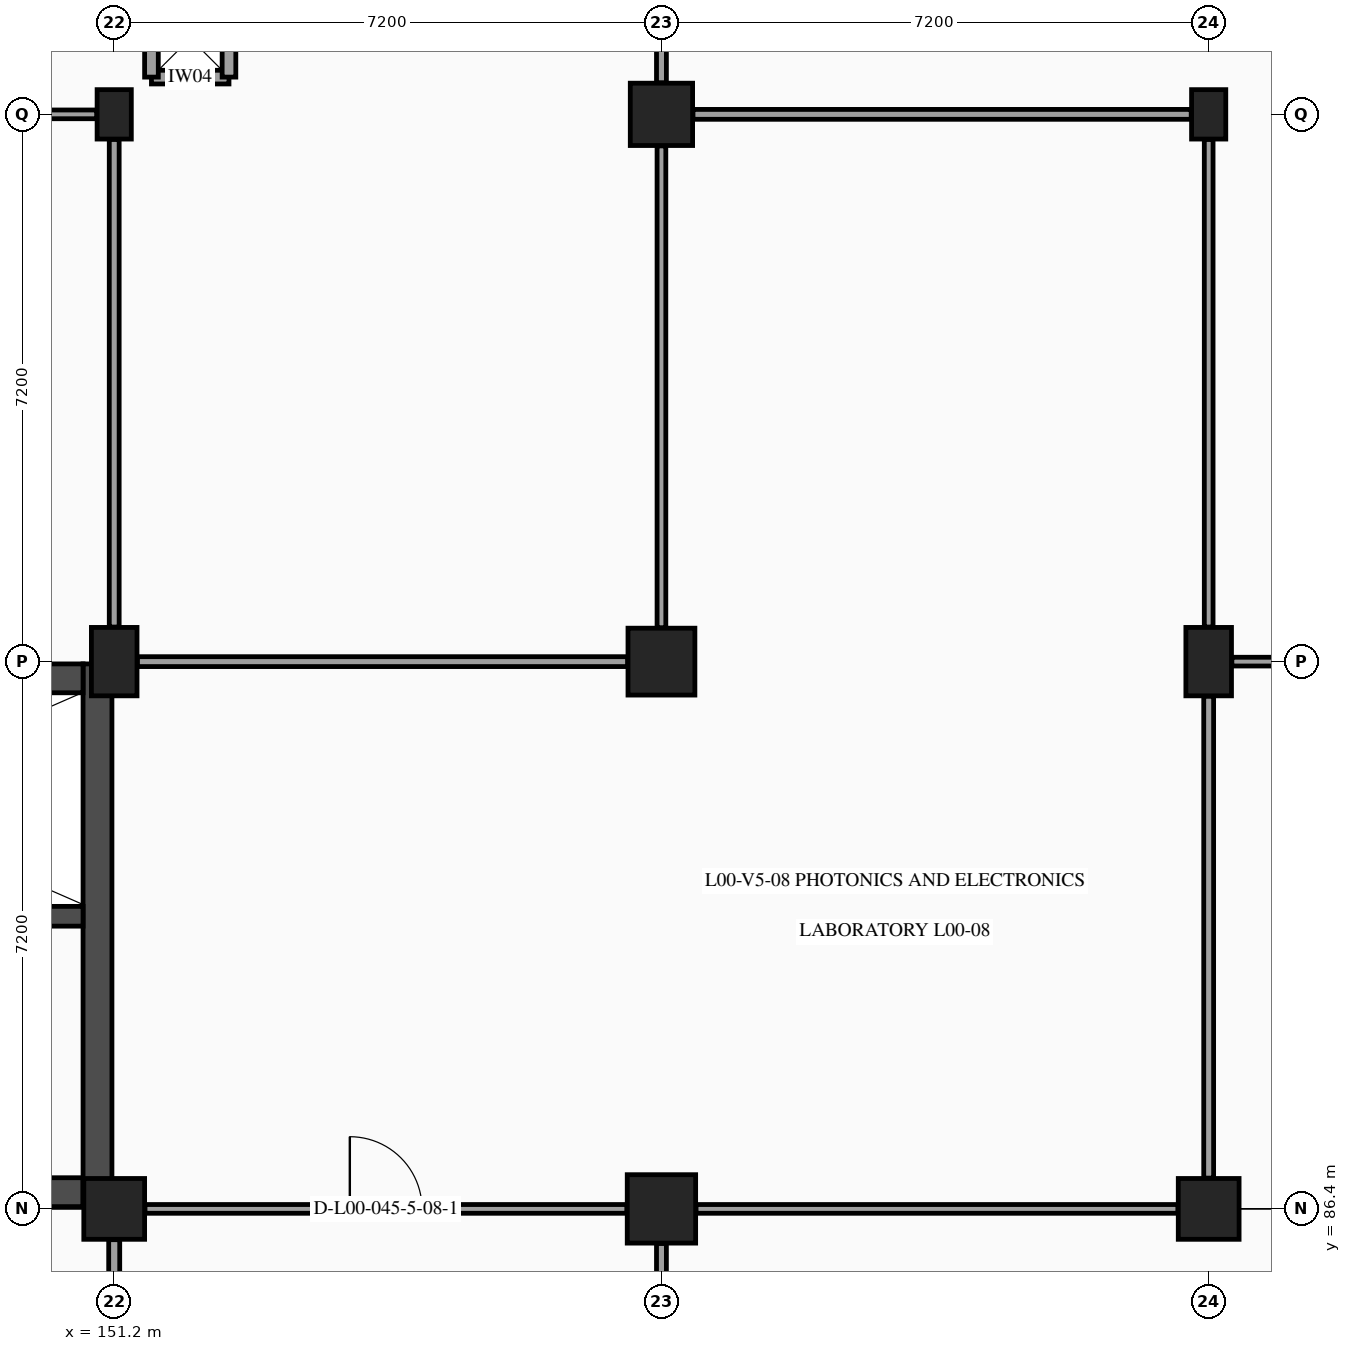
"""IFC4 building model, lengths in metres.
Left out: names, types, materials, properties, quantities, classifications, styles, units other than length and angle.
Written with IfcOpenShell. Run it as: python <this file> out.ifc"""

import sys

from ifc_helpers import new_model, si_unit, direction, frame, frame_2d, origin, origin_2d, place, context, subcontext, project, spatial, rectangle, extrude, element, fill, save


model = new_model("IFC4")
c1 = context("Model", 3, precision=1e-05, world=origin(), true_north=direction((0.0, 1.0)))
c2 = subcontext(c1, "Body", "Model", "MODEL_VIEW")
j1 = project(units=[si_unit("LENGTHUNIT", "METRE"), si_unit("PLANEANGLEUNIT", "RADIAN")], contexts=[c1])
p1 = place(None, origin())
s1 = spatial("IfcSite", under=j1, at=p1, CompositionType="ELEMENT")
p2 = place(p1, origin())
s2 = spatial("IfcBuilding", under=s1, at=p2, CompositionType="ELEMENT")
p3 = place(p2, origin())
s3 = spatial("IfcBuildingStorey", under=s2, at=p3, CompositionType="ELEMENT", Elevation=0.0)
p4 = place(p3, frame((151.2, 86.4, 0.0), z_axis=(0.0, 0.0, 1.0), x_axis=(1.0, 0.0, 0.0)))
e1 = element("IfcColumn", 1, at=p4, inside=s3, PredefinedType="COLUMN", context=c2, shape_type="SweptSolid", body=[
    extrude(rectangle(XDim=0.8, YDim=0.8, at=origin_2d()), origin(), (0.0, 0.0, 1.0), 5.4),
])
p5 = place(p3, frame((151.2, 93.6, 0.0), z_axis=(0.0, 0.0, 1.0), x_axis=(1.0, 0.0, 0.0)))
e2 = element("IfcColumn", 2, at=p5, inside=s3, PredefinedType="COLUMN", context=c2, shape_type="SweptSolid", body=[
    extrude(rectangle(XDim=0.6, YDim=0.9, at=origin_2d()), origin(), (0.0, 0.0, 1.0), 5.4),
])
p6 = place(p3, frame((151.2, 100.8, 0.0), z_axis=(0.0, 0.0, 1.0), x_axis=(1.0, 0.0, 0.0)))
e3 = element("IfcColumn", 3, at=p6, inside=s3, PredefinedType="PILASTER", context=c2, shape_type="SweptSolid", body=[
    extrude(rectangle(XDim=0.45, YDim=0.65, at=origin_2d()), origin(), (0.0, 0.0, 1.0), 5.4),
])
p7 = place(p3, frame((158.4, 86.4, 0.0), z_axis=(0.0, 0.0, 1.0), x_axis=(1.0, 0.0, 0.0)))
e4 = element("IfcColumn", 4, at=p7, inside=s3, PredefinedType="COLUMN", context=c2, shape_type="SweptSolid", body=[
    extrude(rectangle(XDim=0.9, YDim=0.9, at=origin_2d()), origin(), (0.0, 0.0, 1.0), 5.4),
])
p8 = place(p3, frame((158.4, 93.6, 0.0), z_axis=(0.0, 0.0, 1.0), x_axis=(1.0, 0.0, 0.0)))
e5 = element("IfcColumn", 5, at=p8, inside=s3, PredefinedType="COLUMN", context=c2, shape_type="SweptSolid", body=[
    extrude(rectangle(XDim=0.88, YDim=0.88, at=origin_2d()), origin(), (0.0, 0.0, 1.0), 5.4),
])
p9 = place(p3, frame((158.4, 100.8, 0.0), z_axis=(0.0, 0.0, 1.0), x_axis=(1.0, 0.0, 0.0)))
e6 = element("IfcColumn", 6, at=p9, inside=s3, PredefinedType="COLUMN", context=c2, shape_type="SweptSolid", body=[
    extrude(rectangle(XDim=0.82, YDim=0.82, at=origin_2d()), origin(), (0.0, 0.0, 1.0), 5.4),
])
p10 = place(p3, frame((165.6, 86.4, 0.0), z_axis=(0.0, 0.0, 1.0), x_axis=(1.0, 0.0, 0.0)))
e7 = element("IfcColumn", 7, at=p10, inside=s3, PredefinedType="COLUMN", context=c2, shape_type="SweptSolid", body=[
    extrude(rectangle(XDim=0.8, YDim=0.8, at=origin_2d()), origin(), (0.0, 0.0, 1.0), 5.4),
])
p11 = place(p3, frame((165.6, 93.6, 0.0), z_axis=(0.0, 0.0, 1.0), x_axis=(1.0, 0.0, 0.0)))
e8 = element("IfcColumn", 8, at=p11, inside=s3, PredefinedType="COLUMN", context=c2, shape_type="SweptSolid", body=[
    extrude(rectangle(XDim=0.6, YDim=0.9, at=origin_2d()), origin(), (0.0, 0.0, 1.0), 5.4),
])
p12 = place(p3, frame((165.6, 100.8, 0.0), z_axis=(0.0, 0.0, 1.0), x_axis=(1.0, 0.0, 0.0)))
e9 = element("IfcColumn", 9, at=p12, inside=s3, PredefinedType="PILASTER", context=c2, shape_type="SweptSolid", body=[
    extrude(rectangle(XDim=0.45, YDim=0.65, at=origin_2d()), origin(), (0.0, 0.0, 1.0), 5.4),
])
p13 = place(p3, frame((144.19, 86.62, 0.0), z_axis=(0.0, 0.0, 1.0), x_axis=(1.0, 0.0, 0.0)))
e10 = element("IfcWall", 10, at=p13, inside=s3, PredefinedType="SHEAR", context=c2, shape_type="SweptSolid", body=[
    extrude(rectangle(XDim=6.6, YDim=0.38, at=frame_2d((3.3, 0.0))), origin(), (0.0, 0.0, 1.0), 5.09),
])
p14 = place(p13, frame((2.22, 0.0, 0.0)))
e11 = element("IfcOpeningElement", 11, at=p14, cuts=e10, PredefinedType="OPENING", context=c2, shape_type="SweptSolid", body=[
    extrude(rectangle(XDim=1.8, YDim=2.2, at=frame_2d((0.9, 1.1))), frame((0.0, 0.2, 0.0), z_axis=(0.0, -1.0, 0.0), x_axis=(1.0, 0.0, 0.0)), (0.0, 0.0, 1.0), 0.4),
])
p15 = place(p3, frame((150.98, 86.43, 0.0), z_axis=(0.0, 0.0, 1.0), x_axis=(0.0, 1.0, 0.0)))
e12 = element("IfcWall", 12, at=p15, inside=s3, PredefinedType="SHEAR", context=c2, shape_type="SweptSolid", body=[
    extrude(rectangle(XDim=7.14, YDim=0.38, at=frame_2d((3.57, 0.0))), origin(), (0.0, 0.0, 1.0), 5.09),
])
p16 = place(p3, frame((144.19, 93.38, 0.0), z_axis=(0.0, 0.0, 1.0), x_axis=(1.0, 0.0, 0.0)))
e13 = element("IfcWall", 13, at=p16, inside=s3, PredefinedType="SHEAR", context=c2, shape_type="SweptSolid", body=[
    extrude(rectangle(XDim=6.6, YDim=0.38, at=frame_2d((3.3, 0.0))), origin(), (0.0, 0.0, 1.0), 5.09),
])
p17 = place(p3, frame((144.19, 90.25, 0.0), z_axis=(0.0, 0.0, 1.0), x_axis=(1.0, 0.0, 0.0)))
e14 = element("IfcWall", 14, at=p17, inside=s3, PredefinedType="SHEAR", context=c2, shape_type="SweptSolid", body=[
    extrude(rectangle(XDim=6.6, YDim=0.26, at=frame_2d((3.3, 0.0))), origin(), (0.0, 0.0, 1.0), 5.09),
])
p18 = place(p17, frame((0.95, 0.0, 0.0)))
e15 = element("IfcOpeningElement", 15, at=p18, cuts=e14, PredefinedType="OPENING", context=c2, shape_type="SweptSolid", body=[
    extrude(rectangle(XDim=1.1, YDim=2.2, at=frame_2d((0.55, 1.1))), frame((0.0, 0.14, 0.0), z_axis=(0.0, -1.0, 0.0), x_axis=(1.0, 0.0, 0.0)), (0.0, 0.0, 1.0), 0.28),
])
p19 = place(p17, frame((4.1, 0.0, 0.0)))
e16 = element("IfcOpeningElement", 16, at=p19, cuts=e14, PredefinedType="OPENING", context=c2, shape_type="SweptSolid", body=[
    extrude(rectangle(XDim=1.4, YDim=2.3, at=frame_2d((0.7, 1.15))), frame((0.0, 0.14, 0.0), z_axis=(0.0, -1.0, 0.0), x_axis=(1.0, 0.0, 0.0)), (0.0, 0.0, 1.0), 0.28),
])
for number, where, z_axis, x_axis in (
    (17, (151.69, 101.29, 0.0), (0.0, 0.0, 1.0), (1.0, 0.0, 0.0)),
    (18, (152.71, 101.29, 0.0), (0.0, 0.0, 1.0), (0.0, 1.0, 0.0)),
    (19, (151.69, 102.31, 0.0), (0.0, 0.0, 1.0), (0.0, -1.0, 0.0)),
):
    element("IfcWall", number, at=place(p3, frame(where, z_axis=z_axis, x_axis=x_axis)), inside=s3, PredefinedType="PARTITIONING", context=c2, shape_type="SweptSolid", body=[
        extrude(rectangle(XDim=1.02, YDim=0.18, at=frame_2d((0.51, 0.0))), origin(), (0.0, 0.0, 1.0), 5.09),
    ])
p20 = place(p3, frame((151.2, 79.615, 0.0), z_axis=(0.0, 0.0, 1.0), x_axis=(0.0, 1.0, 0.0)))
e20 = element("IfcWall", 20, at=p20, inside=s3, PredefinedType="PARTITIONING", context=c2, shape_type="SweptSolid", body=[
    extrude(rectangle(XDim=6.38, YDim=0.145, at=frame_2d((3.19, 0.0))), origin(), (0.0, 0.0, 1.0), 4.395),
])
p21 = place(p3, frame((151.2, 94.055, 0.0), z_axis=(0.0, 0.0, 1.0), x_axis=(0.0, 1.0, 0.0)))
e21 = element("IfcWall", 21, at=p21, inside=s3, PredefinedType="PARTITIONING", context=c2, shape_type="SweptSolid", body=[
    extrude(rectangle(XDim=6.415, YDim=0.13, at=frame_2d((3.208, 0.0))), origin(), (0.0, 0.0, 1.0), 4.46),
])
p22 = place(p3, frame((144.415, 100.8, 0.0), z_axis=(0.0, 0.0, 1.0), x_axis=(1.0, 0.0, 0.0)))
e22 = element("IfcWall", 22, at=p22, inside=s3, PredefinedType="PARTITIONING", context=c2, shape_type="SweptSolid", body=[
    extrude(rectangle(XDim=6.555, YDim=0.115, at=frame_2d((3.277, 0.0))), origin(), (0.0, 0.0, 1.0), 4.31),
])
p23 = place(p3, frame((158.4, 79.53, 0.0), z_axis=(0.0, 0.0, 1.0), x_axis=(0.0, 1.0, 0.0)))
e23 = element("IfcWall", 23, at=p23, inside=s3, PredefinedType="PARTITIONING", context=c2, shape_type="SweptSolid", body=[
    extrude(rectangle(XDim=6.415, YDim=0.13, at=frame_2d((3.208, 0.0))), origin(), (0.0, 0.0, 1.0), 4.395),
])
p24 = place(p23, frame((2.248, 0.0, 0.0)))
e24 = element("IfcOpeningElement", 24, at=p24, cuts=e23, PredefinedType="OPENING", context=c2, shape_type="SweptSolid", body=[
    extrude(rectangle(XDim=1.92, YDim=2.35, at=frame_2d((0.96, 1.175))), frame((0.0, 0.075, 0.0), z_axis=(0.0, -1.0, 0.0), x_axis=(1.0, 0.0, 0.0)), (0.0, 0.0, 1.0), 0.15),
])
p25 = place(p3, frame((151.605, 86.4, 0.0), z_axis=(0.0, 0.0, 1.0), x_axis=(1.0, 0.0, 0.0)))
e25 = element("IfcWall", 25, at=p25, inside=s3, PredefinedType="PARTITIONING", context=c2, shape_type="SweptSolid", body=[
    extrude(rectangle(XDim=6.34, YDim=0.115, at=frame_2d((3.17, 0.0))), origin(), (0.0, 0.0, 1.0), 4.34),
])
p26 = place(p25, frame((2.695, 0.0, 0.0)))
e26 = element("IfcOpeningElement", 26, at=p26, cuts=e25, PredefinedType="OPENING", context=c2, shape_type="SweptSolid", body=[
    extrude(rectangle(XDim=0.95, YDim=2.15, at=frame_2d((0.475, 1.075))), frame((0.0, 0.067, 0.0), z_axis=(0.0, -1.0, 0.0), x_axis=(1.0, 0.0, 0.0)), (0.0, 0.0, 1.0), 0.135),
])
p27 = place(p3, frame((151.505, 93.6, 0.0), z_axis=(0.0, 0.0, 1.0), x_axis=(1.0, 0.0, 0.0)))
e27 = element("IfcWall", 27, at=p27, inside=s3, PredefinedType="PARTITIONING", context=c2, shape_type="SweptSolid", body=[
    extrude(rectangle(XDim=6.45, YDim=0.13, at=frame_2d((3.225, 0.0))), origin(), (0.0, 0.0, 1.0), 4.34),
])
p28 = place(p3, frame((158.4, 94.045, 0.0), z_axis=(0.0, 0.0, 1.0), x_axis=(0.0, 1.0, 0.0)))
e28 = element("IfcWall", 28, at=p28, inside=s3, PredefinedType="PARTITIONING", context=c2, shape_type="SweptSolid", body=[
    extrude(rectangle(XDim=6.34, YDim=0.115, at=frame_2d((3.17, 0.0))), origin(), (0.0, 0.0, 1.0), 4.46),
])
p29 = place(p3, frame((158.4, 101.215, 0.0), z_axis=(0.0, 0.0, 1.0), x_axis=(0.0, 1.0, 0.0)))
e29 = element("IfcWall", 29, at=p29, inside=s3, PredefinedType="PARTITIONING", context=c2, shape_type="SweptSolid", body=[
    extrude(rectangle(XDim=6.38, YDim=0.13, at=frame_2d((3.19, 0.0))), origin(), (0.0, 0.0, 1.0), 4.455),
])
p30 = place(p29, frame((2.31, 0.0, 0.0)))
e30 = element("IfcOpeningElement", 30, at=p30, cuts=e29, PredefinedType="OPENING", context=c2, shape_type="SweptSolid", body=[
    extrude(rectangle(XDim=1.76, YDim=2.3, at=frame_2d((0.88, 1.15))), frame((0.0, 0.075, 0.0), z_axis=(0.0, -1.0, 0.0), x_axis=(1.0, 0.0, 0.0)), (0.0, 0.0, 1.0), 0.15),
])
p31 = place(p3, frame((158.855, 86.4, 0.0), z_axis=(0.0, 0.0, 1.0), x_axis=(1.0, 0.0, 0.0)))
e31 = element("IfcWall", 31, at=p31, inside=s3, PredefinedType="PARTITIONING", context=c2, shape_type="SweptSolid", body=[
    extrude(rectangle(XDim=6.34, YDim=0.115, at=frame_2d((3.17, 0.0))), origin(), (0.0, 0.0, 1.0), 4.35),
])
p32 = place(p3, frame((165.6, 86.805, 0.0), z_axis=(0.0, 0.0, 1.0), x_axis=(0.0, 1.0, 0.0)))
e32 = element("IfcWall", 32, at=p32, inside=s3, PredefinedType="PARTITIONING", context=c2, shape_type="SweptSolid", body=[
    extrude(rectangle(XDim=6.34, YDim=0.13, at=frame_2d((3.17, 0.0))), origin(), (0.0, 0.0, 1.0), 4.395),
])
p33 = place(p3, frame((165.6, 94.055, 0.0), z_axis=(0.0, 0.0, 1.0), x_axis=(0.0, 1.0, 0.0)))
e33 = element("IfcWall", 33, at=p33, inside=s3, PredefinedType="PARTITIONING", context=c2, shape_type="SweptSolid", body=[
    extrude(rectangle(XDim=6.415, YDim=0.115, at=frame_2d((3.208, 0.0))), origin(), (0.0, 0.0, 1.0), 4.46),
])
p34 = place(p3, frame((158.815, 100.8, 0.0), z_axis=(0.0, 0.0, 1.0), x_axis=(1.0, 0.0, 0.0)))
e34 = element("IfcWall", 34, at=p34, inside=s3, PredefinedType="PARTITIONING", context=c2, shape_type="SweptSolid", body=[
    extrude(rectangle(XDim=6.555, YDim=0.13, at=frame_2d((3.278, 0.0))), origin(), (0.0, 0.0, 1.0), 4.35),
])
p35 = place(p3, frame((165.905, 93.6, 0.0), z_axis=(0.0, 0.0, 1.0), x_axis=(1.0, 0.0, 0.0)))
e35 = element("IfcWall", 35, at=p35, inside=s3, PredefinedType="PARTITIONING", context=c2, shape_type="SweptSolid", body=[
    extrude(rectangle(XDim=6.45, YDim=0.115, at=frame_2d((3.225, 0.0))), origin(), (0.0, 0.0, 1.0), 4.365),
])
p36 = place(p26, origin())
e36 = element("IfcDoor", 36, at=p36, inside=s3, OperationType="SINGLE_SWING_LEFT", PredefinedType="DOOR", context=c2, shape_type="SweptSolid", body=[
    extrude(rectangle(XDim=0.95, YDim=2.15, at=frame_2d((0.475, 1.075))), frame((0.0, 0.025, 0.0), z_axis=(0.0, -1.0, 0.0), x_axis=(1.0, 0.0, 0.0)), (0.0, 0.0, 1.0), 0.05),
])
fill(e26, e36)
save(model, sys.argv[1])
